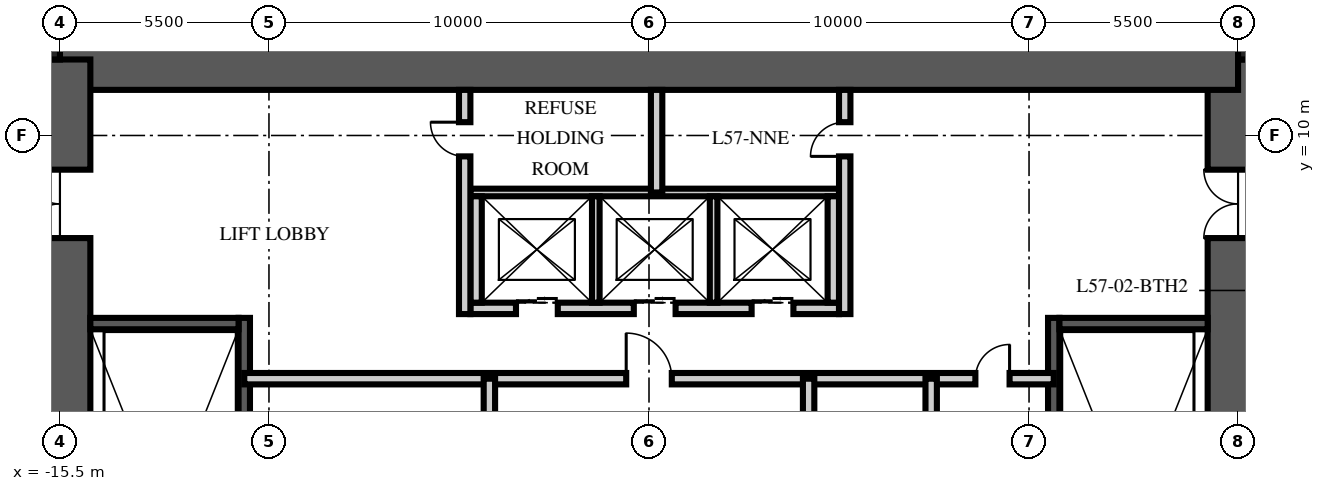
"""IFC4 building model, lengths in metres.
Left out: names, types, materials, properties, quantities, classifications, styles, units other than length and angle.
Written with IfcOpenShell. Run it as: python <this file> out.ifc"""

import sys

from ifc_helpers import new_model, si_unit, direction, frame, frame_2d, origin, origin_2d, place, context, subcontext, project, spatial, rectangle, extrude, element, fill, save


model = new_model("IFC4")
c1 = context("Model", 3, precision=1e-05, world=origin(), true_north=direction((0.0, 1.0)))
c2 = subcontext(c1, "Body", "Model", "MODEL_VIEW")
j1 = project(units=[si_unit("LENGTHUNIT", "METRE"), si_unit("PLANEANGLEUNIT", "RADIAN")], contexts=[c1])
p1 = place(None, origin())
s1 = spatial("IfcSite", under=j1, at=p1, CompositionType="ELEMENT")
p2 = place(p1, origin())
s2 = spatial("IfcBuilding", under=s1, at=p2, CompositionType="ELEMENT")
p3 = place(p2, frame((0.0, 0.0, 229.5)))
s3 = spatial("IfcBuildingStorey", under=s2, at=p3, CompositionType="ELEMENT", Elevation=229.5)
p4 = place(p3, frame((15.5, -12.0, -0.25), z_axis=(0.0, 0.0, 1.0), x_axis=(0.0, 1.0, 0.0)))
e1 = element("IfcWall", 1, at=p4, inside=s3, PredefinedType="SHEAR", context=c2, shape_type="SweptSolid", body=[
    extrude(rectangle(XDim=24.0, YDim=1.6, at=frame_2d((12.0, 0.0))), origin(), (0.0, 0.0, 1.0), 3.75),
])
p5 = place(p4, frame((3.2, 0.0, 0.25)))
e2 = element("IfcOpeningElement", 2, at=p5, cuts=e1, PredefinedType="OPENING", context=c2, shape_type="SweptSolid", body=[
    extrude(rectangle(XDim=1.2, YDim=2.1, at=frame_2d((0.6, 1.05))), frame((0.0, 0.81, 0.0), z_axis=(0.0, -1.0, 0.0), x_axis=(1.0, 0.0, 0.0)), (0.0, 0.0, 1.0), 1.62),
])
p6 = place(p4, frame((19.3, 0.0, 0.25)))
e3 = element("IfcOpeningElement", 3, at=p6, cuts=e1, PredefinedType="OPENING", context=c2, shape_type="SweptSolid", body=[
    extrude(rectangle(XDim=1.8, YDim=2.1, at=frame_2d((0.9, 1.05))), frame((0.0, 0.81, 0.0), z_axis=(0.0, -1.0, 0.0), x_axis=(1.0, 0.0, 0.0)), (0.0, 0.0, 1.0), 1.62),
])
p7 = place(p3, frame((-15.5, 12.0, -0.25), z_axis=(0.0, 0.0, 1.0), x_axis=(1.0, 0.0, 0.0)))
e4 = element("IfcWall", 4, at=p7, inside=s3, PredefinedType="SHEAR", context=c2, shape_type="SweptSolid", body=[
    extrude(rectangle(XDim=31.0, YDim=1.6, at=frame_2d((15.5, 0.0))), origin(), (0.0, 0.0, 1.0), 3.75),
])
p8 = place(p3, frame((-15.5, -12.0, -0.25), z_axis=(0.0, 0.0, 1.0), x_axis=(0.0, 1.0, 0.0)))
e5 = element("IfcWall", 5, at=p8, inside=s3, PredefinedType="SHEAR", context=c2, shape_type="SweptSolid", body=[
    extrude(rectangle(XDim=24.0, YDim=1.6, at=frame_2d((12.0, 0.0))), origin(), (0.0, 0.0, 1.0), 3.75),
])
p9 = place(p8, frame((3.2, 0.0, 0.25)))
e6 = element("IfcOpeningElement", 6, at=p9, cuts=e5, PredefinedType="OPENING", context=c2, shape_type="SweptSolid", body=[
    extrude(rectangle(XDim=1.2, YDim=2.1, at=frame_2d((0.6, 1.05))), frame((0.0, 0.81, 0.0), z_axis=(0.0, -1.0, 0.0), x_axis=(1.0, 0.0, 0.0)), (0.0, 0.0, 1.0), 1.62),
])
p10 = place(p8, frame((19.3, 0.0, 0.25)))
e7 = element("IfcOpeningElement", 7, at=p10, cuts=e5, PredefinedType="OPENING", context=c2, shape_type="SweptSolid", body=[
    extrude(rectangle(XDim=1.8, YDim=2.1, at=frame_2d((0.9, 1.05))), frame((0.0, 0.81, 0.0), z_axis=(0.0, -1.0, 0.0), x_axis=(1.0, 0.0, 0.0)), (0.0, 0.0, 1.0), 1.62),
])
for number, where, z_axis, x_axis in (
    (8, (15.9, 12.4, -0.25), (0.0, 0.0, 1.0), (1.0, 0.0, 0.0)),
    (9, (-15.9, 12.4, -0.25), (0.0, 0.0, 1.0), (1.0, 0.0, 0.0)),
):
    element("IfcColumn", number, at=place(p3, frame(where, z_axis=z_axis, x_axis=x_axis)), inside=s3, PredefinedType="COLUMN", context=c2, shape_type="SweptSolid", body=[
        extrude(rectangle(XDim=0.8, YDim=0.8, at=origin_2d()), origin(), (0.0, 0.0, 1.0), 3.75),
    ])
p11 = place(p3, frame((-10.65, -4.9, 0.0), z_axis=(0.0, 0.0, 1.0), x_axis=(0.0, 1.0, 0.0)))
e10 = element("IfcWall", 10, at=p11, inside=s3, PredefinedType="SOLIDWALL", context=c2, shape_type="SweptSolid", body=[
    extrude(rectangle(XDim=10.1, YDim=0.3, at=frame_2d((5.05, 0.0))), origin(), (0.0, 0.0, 1.0), 3.5),
])
p12 = place(p3, frame((-14.7, 5.05, 0.0), z_axis=(0.0, 0.0, 1.0), x_axis=(1.0, 0.0, 0.0)))
e11 = element("IfcWall", 11, at=p12, inside=s3, PredefinedType="SOLIDWALL", context=c2, shape_type="SweptSolid", body=[
    extrude(rectangle(XDim=3.9, YDim=0.3, at=frame_2d((1.95, 0.0))), origin(), (0.0, 0.0, 1.0), 3.5),
])
p13 = place(p3, frame((10.65, -4.9, 0.0), z_axis=(0.0, 0.0, 1.0), x_axis=(0.0, 1.0, 0.0)))
e12 = element("IfcWall", 12, at=p13, inside=s3, PredefinedType="SOLIDWALL", context=c2, shape_type="SweptSolid", body=[
    extrude(rectangle(XDim=10.1, YDim=0.3, at=frame_2d((5.05, 0.0))), origin(), (0.0, 0.0, 1.0), 3.5),
])
p14 = place(p3, frame((14.7, 5.05, 0.0), z_axis=(0.0, 0.0, 1.0), x_axis=(-1.0, 0.0, 0.0)))
e13 = element("IfcWall", 13, at=p14, inside=s3, PredefinedType="SOLIDWALL", context=c2, shape_type="SweptSolid", body=[
    extrude(rectangle(XDim=3.9, YDim=0.3, at=frame_2d((1.95, 0.0))), origin(), (0.0, 0.0, 1.0), 3.5),
])
p15 = place(p3, frame((-4.7, 5.45, 0.0), z_axis=(0.0, 0.0, 1.0), x_axis=(1.0, 0.0, 0.0)))
e14 = element("IfcWall", 14, at=p15, inside=s3, PredefinedType="PARTITIONING", context=c2, shape_type="SweptSolid", body=[
    extrude(rectangle(XDim=9.7, YDim=0.3, at=frame_2d((4.85, 0.0))), origin(), (0.0, 0.0, 1.0), 3.5),
])
p16 = place(p15, frame((1.2, 0.0, 0.0)))
e15 = element("IfcOpeningElement", 15, at=p16, cuts=e14, PredefinedType="OPENING", context=c2, shape_type="SweptSolid", body=[
    extrude(rectangle(XDim=1.1, YDim=2.1, at=frame_2d((0.55, 1.05))), frame((0.0, 0.16, 0.0), z_axis=(0.0, -1.0, 0.0), x_axis=(1.0, 0.0, 0.0)), (0.0, 0.0, 1.0), 0.32),
])
p17 = place(p15, frame((4.3, 0.0, 0.0)))
e16 = element("IfcOpeningElement", 16, at=p17, cuts=e14, PredefinedType="OPENING", context=c2, shape_type="SweptSolid", body=[
    extrude(rectangle(XDim=1.1, YDim=2.1, at=frame_2d((0.55, 1.05))), frame((0.0, 0.16, 0.0), z_axis=(0.0, -1.0, 0.0), x_axis=(1.0, 0.0, 0.0)), (0.0, 0.0, 1.0), 0.32),
])
p18 = place(p15, frame((7.4, 0.0, 0.0)))
e17 = element("IfcOpeningElement", 17, at=p18, cuts=e14, PredefinedType="OPENING", context=c2, shape_type="SweptSolid", body=[
    extrude(rectangle(XDim=1.1, YDim=2.1, at=frame_2d((0.55, 1.05))), frame((0.0, 0.16, 0.0), z_axis=(0.0, -1.0, 0.0), x_axis=(1.0, 0.0, 0.0)), (0.0, 0.0, 1.0), 0.32),
])
p19 = place(p3, frame((-4.7, 8.5, 0.0), z_axis=(0.0, 0.0, 1.0), x_axis=(1.0, 0.0, 0.0)))
e18 = element("IfcWall", 18, at=p19, inside=s3, PredefinedType="PARTITIONING", context=c2, shape_type="SweptSolid", body=[
    extrude(rectangle(XDim=9.7, YDim=0.2, at=frame_2d((4.85, 0.0))), origin(), (0.0, 0.0, 1.0), 3.5),
])
for number, where, z_axis, x_axis in (
    (19, (-4.55, 5.6, 0.0), (0.0, 0.0, 1.0), (0.0, 1.0, 0.0)),
    (20, (4.85, 5.6, 0.0), (0.0, 0.0, 1.0), (0.0, 1.0, 0.0)),
):
    element("IfcWall", number, at=place(p3, frame(where, z_axis=z_axis, x_axis=x_axis)), inside=s3, PredefinedType="PARTITIONING", context=c2, shape_type="SweptSolid", body=[
        extrude(rectangle(XDim=2.8, YDim=0.3, at=frame_2d((1.4, 0.0))), origin(), (0.0, 0.0, 1.0), 3.5),
    ])
for number, where, z_axis, x_axis in (
    (21, (-1.4, 5.6, 0.0), (0.0, 0.0, 1.0), (0.0, 1.0, 0.0)),
    (22, (1.7, 5.6, 0.0), (0.0, 0.0, 1.0), (0.0, 1.0, 0.0)),
):
    element("IfcWall", number, at=place(p3, frame(where, z_axis=z_axis, x_axis=x_axis)), inside=s3, PredefinedType="PARTITIONING", context=c2, shape_type="SweptSolid", body=[
        extrude(rectangle(XDim=2.8, YDim=0.2, at=frame_2d((1.4, 0.0))), origin(), (0.0, 0.0, 1.0), 3.5),
    ])
p20 = place(p3, frame((-10.65, 3.6, 0.0), z_axis=(0.0, 0.0, 1.0), x_axis=(1.0, 0.0, 0.0)))
e23 = element("IfcWall", 23, at=p20, inside=s3, PredefinedType="PARTITIONING", context=c2, shape_type="SweptSolid", body=[
    extrude(rectangle(XDim=21.3, YDim=0.3, at=frame_2d((10.65, 0.0))), origin(), (0.0, 0.0, 1.0), 3.5),
])
p21 = place(p20, frame((10.05, 0.0, 0.0)))
e24 = element("IfcOpeningElement", 24, at=p21, cuts=e23, PredefinedType="OPENING", context=c2, shape_type="SweptSolid", body=[
    extrude(rectangle(XDim=1.2, YDim=2.1, at=frame_2d((0.6, 1.05))), frame((0.0, 0.16, 0.0), z_axis=(0.0, -1.0, 0.0), x_axis=(1.0, 0.0, 0.0)), (0.0, 0.0, 1.0), 0.32),
])
p22 = place(p20, frame((19.238, 0.0, 0.0)))
e25 = element("IfcOpeningElement", 25, at=p22, cuts=e23, PredefinedType="OPENING", context=c2, shape_type="SweptSolid", body=[
    extrude(rectangle(XDim=0.9, YDim=2.1, at=frame_2d((0.45, 1.05))), frame((0.0, 0.16, 0.0), z_axis=(0.0, -1.0, 0.0), x_axis=(1.0, 0.0, 0.0)), (0.0, 0.0, 1.0), 0.32),
])
p23 = place(p3, frame((-4.2, -6.65, 0.0), z_axis=(0.0, 0.0, 1.0), x_axis=(0.0, 1.0, 0.0)))
e26 = element("IfcWall", 26, at=p23, inside=s3, PredefinedType="PARTITIONING", context=c2, shape_type="SweptSolid", body=[
    extrude(rectangle(XDim=10.25, YDim=0.3, at=frame_2d((5.125, 0.0))), origin(), (0.0, 0.0, 1.0), 3.5),
])
p24 = place(p23, frame((0.787, 0.0, 0.0)))
e27 = element("IfcOpeningElement", 27, at=p24, cuts=e26, PredefinedType="OPENING", context=c2, shape_type="SweptSolid", body=[
    extrude(rectangle(XDim=0.9, YDim=2.1, at=frame_2d((0.45, 1.05))), frame((0.0, 0.16, 0.0), z_axis=(0.0, -1.0, 0.0), x_axis=(1.0, 0.0, 0.0)), (0.0, 0.0, 1.0), 0.32),
])
p25 = place(p23, frame((5.912, 0.0, 0.0)))
e28 = element("IfcOpeningElement", 28, at=p25, cuts=e26, PredefinedType="OPENING", context=c2, shape_type="SweptSolid", body=[
    extrude(rectangle(XDim=0.9, YDim=2.1, at=frame_2d((0.45, 1.05))), frame((0.0, 0.16, 0.0), z_axis=(0.0, -1.0, 0.0), x_axis=(1.0, 0.0, 0.0)), (0.0, 0.0, 1.0), 0.32),
])
p26 = place(p3, frame((4.2, -6.65, 0.0), z_axis=(0.0, 0.0, 1.0), x_axis=(0.0, 1.0, 0.0)))
e29 = element("IfcWall", 29, at=p26, inside=s3, PredefinedType="PARTITIONING", context=c2, shape_type="SweptSolid", body=[
    extrude(rectangle(XDim=10.25, YDim=0.3, at=frame_2d((5.125, 0.0))), origin(), (0.0, 0.0, 1.0), 3.5),
])
p27 = place(p26, frame((2.15, 0.0, 0.0)))
e30 = element("IfcOpeningElement", 30, at=p27, cuts=e29, PredefinedType="OPENING", context=c2, shape_type="SweptSolid", body=[
    extrude(rectangle(XDim=0.9, YDim=2.1, at=frame_2d((0.45, 1.05))), frame((0.0, 0.16, 0.0), z_axis=(0.0, -1.0, 0.0), x_axis=(1.0, 0.0, 0.0)), (0.0, 0.0, 1.0), 0.32),
])
p28 = place(p26, frame((7.275, 0.0, 0.0)))
e31 = element("IfcOpeningElement", 31, at=p28, cuts=e29, PredefinedType="OPENING", context=c2, shape_type="SweptSolid", body=[
    extrude(rectangle(XDim=0.9, YDim=2.1, at=frame_2d((0.45, 1.05))), frame((0.0, 0.16, 0.0), z_axis=(0.0, -1.0, 0.0), x_axis=(1.0, 0.0, 0.0)), (0.0, 0.0, 1.0), 0.32),
])
p29 = place(p3, frame((7.425, -1.45, 0.0), z_axis=(0.0, 0.0, 1.0), x_axis=(0.0, 1.0, 0.0)))
e32 = element("IfcWall", 32, at=p29, inside=s3, PredefinedType="PARTITIONING", context=c2, shape_type="SweptSolid", body=[
    extrude(rectangle(XDim=5.05, YDim=0.3, at=frame_2d((2.525, 0.0))), origin(), (0.0, 0.0, 1.0), 3.5),
])
p30 = place(p3, frame((-4.85, 5.3, 0.0), z_axis=(0.0, 0.0, 1.0), x_axis=(0.0, 1.0, 0.0)))
e33 = element("IfcWall", 33, at=p30, inside=s3, PredefinedType="PARTITIONING", context=c2, shape_type="SweptSolid", body=[
    extrude(rectangle(XDim=5.9, YDim=0.3, at=frame_2d((2.95, 0.0))), origin(), (0.0, 0.0, 1.0), 3.5),
])
p31 = place(p30, frame((4.15, 0.0, 0.0)))
e34 = element("IfcOpeningElement", 34, at=p31, cuts=e33, PredefinedType="OPENING", context=c2, shape_type="SweptSolid", body=[
    extrude(rectangle(XDim=0.9, YDim=2.1, at=frame_2d((0.45, 1.05))), frame((0.0, 0.16, 0.0), z_axis=(0.0, -1.0, 0.0), x_axis=(1.0, 0.0, 0.0)), (0.0, 0.0, 1.0), 0.32),
])
p32 = place(p3, frame((5.15, 5.3, 0.0), z_axis=(0.0, 0.0, 1.0), x_axis=(0.0, 1.0, 0.0)))
e35 = element("IfcWall", 35, at=p32, inside=s3, PredefinedType="PARTITIONING", context=c2, shape_type="SweptSolid", body=[
    extrude(rectangle(XDim=5.9, YDim=0.3, at=frame_2d((2.95, 0.0))), origin(), (0.0, 0.0, 1.0), 3.5),
])
p33 = place(p32, frame((4.15, 0.0, 0.0)))
e36 = element("IfcOpeningElement", 36, at=p33, cuts=e35, PredefinedType="OPENING", context=c2, shape_type="SweptSolid", body=[
    extrude(rectangle(XDim=0.9, YDim=2.1, at=frame_2d((0.45, 1.05))), frame((0.0, 0.16, 0.0), z_axis=(0.0, -1.0, 0.0), x_axis=(1.0, 0.0, 0.0)), (0.0, 0.0, 1.0), 0.32),
])
p34 = place(p3, frame((0.2, 8.5, 0.0), z_axis=(0.0, 0.0, 1.0), x_axis=(0.0, 1.0, 0.0)))
e37 = element("IfcWall", 37, at=p34, inside=s3, PredefinedType="PARTITIONING", context=c2, shape_type="SweptSolid", body=[
    extrude(rectangle(XDim=2.7, YDim=0.3, at=frame_2d((1.35, 0.0))), origin(), (0.0, 0.0, 1.0), 3.5),
])
p35 = place(p10, origin())
e38 = element("IfcDoor", 38, at=p35, inside=s3, OperationType="DOUBLE_DOOR_SINGLE_SWING", PredefinedType="DOOR", context=c2, shape_type="SweptSolid", body=[
    extrude(rectangle(XDim=1.8, YDim=2.1, at=frame_2d((0.9, 1.05))), frame((0.0, 0.025, 0.0), z_axis=(0.0, -1.0, 0.0), x_axis=(1.0, 0.0, 0.0)), (0.0, 0.0, 1.0), 0.05),
])
fill(e7, e38)
p36 = place(p6, origin())
e39 = element("IfcDoor", 39, at=p36, inside=s3, OperationType="DOUBLE_DOOR_SINGLE_SWING", PredefinedType="DOOR", context=c2, shape_type="SweptSolid", body=[
    extrude(rectangle(XDim=1.8, YDim=2.1, at=frame_2d((0.9, 1.05))), frame((0.0, 0.025, 0.0), z_axis=(0.0, -1.0, 0.0), x_axis=(1.0, 0.0, 0.0)), (0.0, 0.0, 1.0), 0.05),
])
fill(e3, e39)
p37 = place(p16, origin())
e40 = element("IfcDoor", 40, at=p37, inside=s3, OperationType="DOUBLE_DOOR_SLIDING", PredefinedType="DOOR", context=c2, shape_type="SweptSolid", body=[
    extrude(rectangle(XDim=1.1, YDim=2.1, at=frame_2d((0.55, 1.05))), frame((0.0, 0.025, 0.0), z_axis=(0.0, -1.0, 0.0), x_axis=(1.0, 0.0, 0.0)), (0.0, 0.0, 1.0), 0.05),
])
fill(e15, e40)
p38 = place(p17, origin())
e41 = element("IfcDoor", 41, at=p38, inside=s3, OperationType="DOUBLE_DOOR_SLIDING", PredefinedType="DOOR", context=c2, shape_type="SweptSolid", body=[
    extrude(rectangle(XDim=1.1, YDim=2.1, at=frame_2d((0.55, 1.05))), frame((0.0, 0.025, 0.0), z_axis=(0.0, -1.0, 0.0), x_axis=(1.0, 0.0, 0.0)), (0.0, 0.0, 1.0), 0.05),
])
fill(e16, e41)
p39 = place(p18, origin())
e42 = element("IfcDoor", 42, at=p39, inside=s3, OperationType="DOUBLE_DOOR_SLIDING", PredefinedType="DOOR", context=c2, shape_type="SweptSolid", body=[
    extrude(rectangle(XDim=1.1, YDim=2.1, at=frame_2d((0.55, 1.05))), frame((0.0, 0.025, 0.0), z_axis=(0.0, -1.0, 0.0), x_axis=(1.0, 0.0, 0.0)), (0.0, 0.0, 1.0), 0.05),
])
fill(e17, e42)
p40 = place(p21, origin())
e43 = element("IfcDoor", 43, at=p40, inside=s3, OperationType="SINGLE_SWING_LEFT", PredefinedType="DOOR", context=c2, shape_type="SweptSolid", body=[
    extrude(rectangle(XDim=1.2, YDim=2.1, at=frame_2d((0.6, 1.05))), frame((0.0, 0.025, 0.0), z_axis=(0.0, -1.0, 0.0), x_axis=(1.0, 0.0, 0.0)), (0.0, 0.0, 1.0), 0.05),
])
fill(e24, e43)
p41 = place(p22, origin())
e44 = element("IfcDoor", 44, at=p41, inside=s3, OperationType="SINGLE_SWING_RIGHT", PredefinedType="DOOR", context=c2, shape_type="SweptSolid", body=[
    extrude(rectangle(XDim=0.9, YDim=2.1, at=frame_2d((0.45, 1.05))), frame((0.0, 0.025, 0.0), z_axis=(0.0, -1.0, 0.0), x_axis=(1.0, 0.0, 0.0)), (0.0, 0.0, 1.0), 0.05),
])
fill(e25, e44)
p42 = place(p31, origin())
e45 = element("IfcDoor", 45, at=p42, inside=s3, OperationType="SINGLE_SWING_RIGHT", PredefinedType="DOOR", context=c2, shape_type="SweptSolid", body=[
    extrude(rectangle(XDim=0.9, YDim=2.1, at=frame_2d((0.45, 1.05))), frame((0.0, 0.025, 0.0), z_axis=(0.0, -1.0, 0.0), x_axis=(1.0, 0.0, 0.0)), (0.0, 0.0, 1.0), 0.05),
])
fill(e34, e45)
p43 = place(p33, origin())
e46 = element("IfcDoor", 46, at=p43, inside=s3, OperationType="SINGLE_SWING_LEFT", PredefinedType="DOOR", context=c2, shape_type="SweptSolid", body=[
    extrude(rectangle(XDim=0.9, YDim=2.1, at=frame_2d((0.45, 1.05))), frame((0.0, 0.025, 0.0), z_axis=(0.0, -1.0, 0.0), x_axis=(1.0, 0.0, 0.0)), (0.0, 0.0, 1.0), 0.05),
])
fill(e36, e46)
save(model, sys.argv[1])
